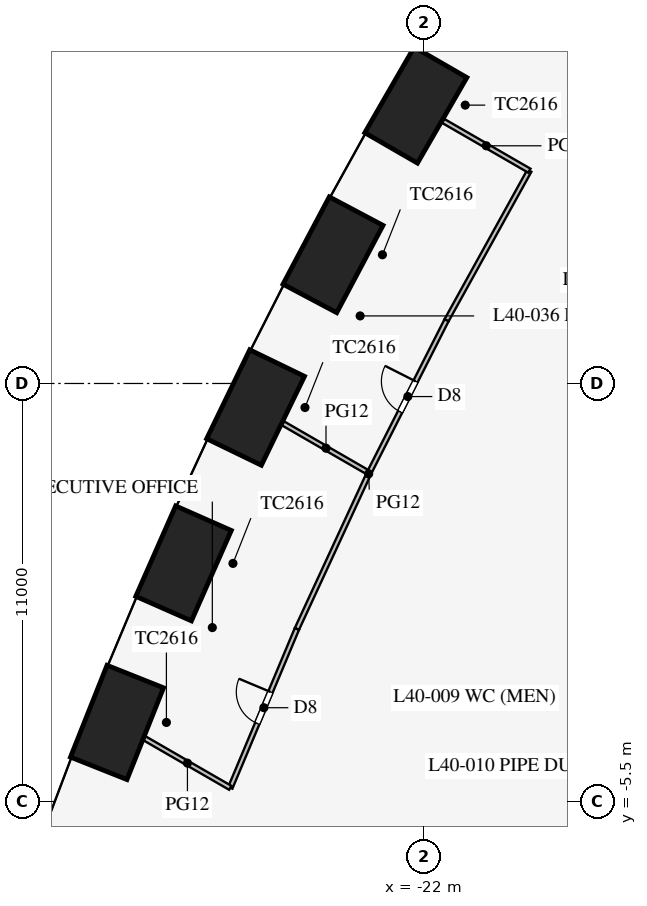
"""IFC4 building model, lengths in metres.
Left out: names, types, materials, properties, quantities, classifications, styles, units other than length and angle.
Written with IfcOpenShell. Run it as: python <this file> out.ifc"""

import sys

from ifc_helpers import new_model, si_unit, direction, frame, frame_2d, origin, origin_2d, place, context, subcontext, project, spatial, rectangle, extrude, element, fill, save


model = new_model("IFC4")
c1 = context("Model", 3, precision=1e-05, world=origin(), true_north=direction((0.0, 1.0)))
c2 = subcontext(c1, "Body", "Model", "MODEL_VIEW")
j1 = project(units=[si_unit("LENGTHUNIT", "METRE"), si_unit("PLANEANGLEUNIT", "RADIAN")], contexts=[c1])
p1 = place(None, origin())
s1 = spatial("IfcSite", under=j1, at=p1, CompositionType="ELEMENT")
p2 = place(p1, origin())
s2 = spatial("IfcBuilding", under=s1, at=p2, CompositionType="ELEMENT")
p3 = place(p2, frame((0.0, 0.0, 174.5)))
s3 = spatial("IfcBuildingStorey", under=s2, at=p3, CompositionType="ELEMENT", Elevation=174.5)
for number, where, z_axis, x_axis in (
    (1, (-22.213, 12.825, 0.0), (0.0, 0.0, 1.0), (-0.5, -0.866, 0.0)),
    (2, (-24.393, 8.887, 0.0), (0.0, 0.0, 1.0), (-0.468, -0.883, 0.0)),
    (3, (-26.43, 4.867, 0.0), (0.0, 0.0, 1.0), (-0.436, -0.9, 0.0)),
    (4, (-28.325, 0.765, 0.0), (0.0, 0.0, 1.0), (-0.403, -0.915, 0.0)),
    (5, (-30.077, -3.42, 0.0), (0.0, 0.0, 1.0), (-0.37, -0.929, 0.0)),
):
    element("IfcColumn", number, at=place(p3, frame(where, z_axis=z_axis, x_axis=x_axis)), inside=s3, PredefinedType="COLUMN", context=c2, shape_type="SweptSolid", body=[
        extrude(rectangle(XDim=2.6, YDim=1.6, at=origin_2d()), origin(), (0.0, 0.0, 1.0), 4.2),
    ])
p4 = place(p3, frame((-19.226, 11.1, 0.0), z_axis=(0.0, 0.0, 1.0), x_axis=(-0.484292898211, -0.874905931368, 0.0)))
e6 = element("IfcWall", 6, at=p4, inside=s3, PredefinedType="PARTITIONING", context=c2, shape_type="SweptSolid", body=[
    extrude(rectangle(XDim=4.501, YDim=0.12, at=frame_2d((2.25, 0.0))), origin(), (0.0, 0.0, 1.0), 2.9),
])
p5 = place(p3, frame((-25.342, -0.958, 0.0), z_axis=(0.0, 0.0, 1.0), x_axis=(-0.386807881778, -0.922160323693, 0.0)))
e7 = element("IfcWall", 7, at=p5, inside=s3, PredefinedType="PARTITIONING", context=c2, shape_type="SweptSolid", body=[
    extrude(rectangle(XDim=4.536, YDim=0.12, at=frame_2d((2.268, 0.0))), origin(), (0.0, 0.0, 1.0), 2.9),
])
p6 = place(p5, frame((1.8, 0.0, 0.15)))
e8 = element("IfcOpeningElement", 8, at=p6, cuts=e7, PredefinedType="OPENING", context=c2, shape_type="SweptSolid", body=[
    extrude(rectangle(XDim=0.9, YDim=2.1, at=frame_2d((0.45, 1.05))), frame((0.0, 0.07, 0.0), z_axis=(0.0, -1.0, 0.0), x_axis=(1.0, 0.0, 0.0)), (0.0, 0.0, 1.0), 0.14),
])
p7 = place(p3, frame((-21.405, 7.162, 0.0), z_axis=(0.0, 0.0, 1.0), x_axis=(-0.452471679136, -0.891778772779, 0.0)))
e9 = element("IfcWall", 9, at=p7, inside=s3, PredefinedType="PARTITIONING", context=c2, shape_type="SweptSolid", body=[
    extrude(rectangle(XDim=4.507, YDim=0.12, at=frame_2d((2.253, 0.0))), origin(), (0.0, 0.0, 1.0), 2.9),
])
p8 = place(p7, frame((1.8, 0.0, 0.15)))
e10 = element("IfcOpeningElement", 10, at=p8, cuts=e9, PredefinedType="OPENING", context=c2, shape_type="SweptSolid", body=[
    extrude(rectangle(XDim=0.9, YDim=2.1, at=frame_2d((0.45, 1.05))), frame((0.0, 0.07, 0.0), z_axis=(0.0, -1.0, 0.0), x_axis=(1.0, 0.0, 0.0)), (0.0, 0.0, 1.0), 0.14),
])
p9 = place(p3, frame((-23.444, 3.143, 0.0), z_axis=(0.0, 0.0, 1.0), x_axis=(-0.419883773418, -0.907577884713, 0.0)))
e11 = element("IfcWall", 11, at=p9, inside=s3, PredefinedType="PARTITIONING", context=c2, shape_type="SweptSolid", body=[
    extrude(rectangle(XDim=4.519, YDim=0.12, at=frame_2d((2.259, 0.0))), origin(), (0.0, 0.0, 1.0), 2.9),
])
p10 = place(p3, frame((-19.226, 11.1, 0.0), z_axis=(0.0, 0.0, 1.0), x_axis=(-0.865997804006, 0.500047801172, 0.0)))
e12 = element("IfcWall", 12, at=p10, inside=s3, PredefinedType="PARTITIONING", context=c2, shape_type="SweptSolid", body=[
    extrude(rectangle(XDim=2.62, YDim=0.12, at=frame_2d((1.31, 0.0))), origin(), (0.0, 0.0, 1.0), 2.15),
])
p11 = place(p3, frame((-27.096, -5.141, 0.0), z_axis=(0.0, 0.0, 1.0), x_axis=(-0.866012205188, 0.500022859943, 0.0)))
e13 = element("IfcWall", 13, at=p11, inside=s3, PredefinedType="PARTITIONING", context=c2, shape_type="SweptSolid", body=[
    extrude(rectangle(XDim=2.603, YDim=0.12, at=frame_2d((1.302, 0.0))), origin(), (0.0, 0.0, 1.0), 2.15),
])
p12 = place(p3, frame((-23.444, 3.143, 0.0), z_axis=(0.0, 0.0, 1.0), x_axis=(-0.866011491631, 0.500024095782, 0.0)))
e14 = element("IfcWall", 14, at=p12, inside=s3, PredefinedType="PARTITIONING", context=c2, shape_type="SweptSolid", body=[
    extrude(rectangle(XDim=2.615, YDim=0.12, at=frame_2d((1.308, 0.0))), origin(), (0.0, 0.0, 1.0), 2.35),
])
p13 = place(p8, frame((0.9, 0.0, 0.0), z_axis=(0.0, 0.0, 1.0), x_axis=(-1.0, 0.0, 0.0)))
e15 = element("IfcDoor", 15, at=p13, inside=s3, OperationType="SINGLE_SWING_RIGHT", PredefinedType="DOOR", context=c2, shape_type="SweptSolid", body=[
    extrude(rectangle(XDim=0.9, YDim=2.1, at=frame_2d((0.45, 1.05))), frame((0.0, 0.025, 0.0), z_axis=(0.0, -1.0, 0.0), x_axis=(1.0, 0.0, 0.0)), (0.0, 0.0, 1.0), 0.05),
])
fill(e10, e15)
p14 = place(p6, frame((0.9, 0.0, 0.0), z_axis=(0.0, 0.0, 1.0), x_axis=(-1.0, 0.0, 0.0)))
e16 = element("IfcDoor", 16, at=p14, inside=s3, OperationType="SINGLE_SWING_RIGHT", PredefinedType="DOOR", context=c2, shape_type="SweptSolid", body=[
    extrude(rectangle(XDim=0.9, YDim=2.1, at=frame_2d((0.45, 1.05))), frame((0.0, 0.025, 0.0), z_axis=(0.0, -1.0, 0.0), x_axis=(1.0, 0.0, 0.0)), (0.0, 0.0, 1.0), 0.05),
])
fill(e8, e16)
save(model, sys.argv[1])
